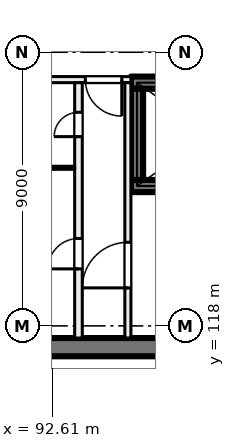
"""IFC4 building model, lengths in metres.
Left out: names, types, materials, properties, quantities, classifications, styles, units other than length and angle.
Written with IfcOpenShell. Run it as: python <this file> out.ifc"""

import sys

from ifc_helpers import new_model, si_unit, direction, frame, frame_2d, origin, place, context, subcontext, project, spatial, rectangle, extrude, element, fill, save


model = new_model("IFC4")
c1 = context("Model", 3, precision=1e-05, world=origin(), true_north=direction((0.0, 1.0)))
c2 = subcontext(c1, "Body", "Model", "MODEL_VIEW")
j1 = project(units=[si_unit("LENGTHUNIT", "METRE"), si_unit("PLANEANGLEUNIT", "RADIAN")], contexts=[c1])
p1 = place(None, origin())
s1 = spatial("IfcSite", under=j1, at=p1, CompositionType="ELEMENT")
p2 = place(p1, origin())
s2 = spatial("IfcBuilding", under=s1, at=p2, CompositionType="ELEMENT")
p3 = place(p2, frame((0.0, 0.0, 17.5)))
s3 = spatial("IfcBuildingStorey", under=s2, at=p3, CompositionType="ELEMENT", Elevation=17.5)
p4 = place(p3, frame((99.6, 117.3, 0.0), z_axis=(0.0, 0.0, 1.0), x_axis=(-1.0, 0.0, 0.0)))
e1 = element("IfcWall", 1, at=p4, inside=s3, PredefinedType="SHEAR", context=c2, shape_type="SweptSolid", body=[
    extrude(rectangle(XDim=8.9, YDim=0.6, at=frame_2d((4.45, 0.0))), origin(), (0.0, 0.0, 1.0), 5.0),
])
p5 = place(p3, frame((107.4, 126.0, 0.0), z_axis=(0.0, 0.0, 1.0), x_axis=(-1.0, 0.0, 0.0)))
e2 = element("IfcWall", 2, at=p5, inside=s3, PredefinedType="SHEAR", context=c2, shape_type="SweptSolid", body=[
    extrude(rectangle(XDim=12.2, YDim=0.4, at=frame_2d((6.1, 0.0))), origin(), (0.0, 0.0, 1.0), 5.0),
])
p6 = place(p5, frame((10.25, 0.0, 0.0)))
e3 = element("IfcOpeningElement", 3, at=p6, cuts=e2, PredefinedType="OPENING", context=c2, shape_type="SweptSolid", body=[
    extrude(rectangle(XDim=1.1, YDim=2.1, at=frame_2d((0.55, 1.05))), frame((0.0, 0.21, 0.0), z_axis=(0.0, -1.0, 0.0), x_axis=(1.0, 0.0, 0.0)), (0.0, 0.0, 1.0), 0.42),
])
p7 = place(p5, frame((0.7, 0.0, 0.0)))
e4 = element("IfcOpeningElement", 4, at=p7, cuts=e2, PredefinedType="OPENING", context=c2, shape_type="SweptSolid", body=[
    extrude(rectangle(XDim=0.8, YDim=2.1, at=frame_2d((0.4, 1.05))), frame((0.0, 0.21, 0.0), z_axis=(0.0, -1.0, 0.0), x_axis=(1.0, 0.0, 0.0)), (0.0, 0.0, 1.0), 0.42),
])
p8 = place(p3, frame((107.4, 122.6, 0.0), z_axis=(0.0, 0.0, 1.0), x_axis=(-1.0, 0.0, 0.0)))
e5 = element("IfcWall", 5, at=p8, inside=s3, PredefinedType="SHEAR", context=c2, shape_type="SweptSolid", body=[
    extrude(rectangle(XDim=12.2, YDim=0.4, at=frame_2d((6.1, 0.0))), origin(), (0.0, 0.0, 1.0), 5.0),
])
p9 = place(p8, frame((7.9, 0.0, 0.0)))
e6 = element("IfcOpeningElement", 6, at=p9, cuts=e5, PredefinedType="OPENING", context=c2, shape_type="SweptSolid", body=[
    extrude(rectangle(XDim=1.1, YDim=2.1, at=frame_2d((0.55, 1.05))), frame((0.0, 0.21, 0.0), z_axis=(0.0, -1.0, 0.0), x_axis=(1.0, 0.0, 0.0)), (0.0, 0.0, 1.0), 0.42),
])
p10 = place(p3, frame((95.4, 125.8, 0.0), z_axis=(0.0, 0.0, 1.0), x_axis=(0.0, -1.0, 0.0)))
e7 = element("IfcWall", 7, at=p10, inside=s3, PredefinedType="SHEAR", context=c2, shape_type="SweptSolid", body=[
    extrude(rectangle(XDim=3.0, YDim=0.4, at=frame_2d((1.5, 0.0))), origin(), (0.0, 0.0, 1.0), 5.0),
])
p11 = place(p3, frame((95.2, 126.1, 0.0), z_axis=(0.0, 0.0, 1.0), x_axis=(-1.0, 0.0, 0.0)))
e8 = element("IfcWall", 8, at=p11, inside=s3, PredefinedType="PARTITIONING", context=c2, shape_type="SweptSolid", body=[
    extrude(rectangle(XDim=3.8, YDim=0.2, at=frame_2d((1.9, 0.0))), origin(), (0.0, 0.0, 1.0), 4.6),
])
p12 = place(p11, frame((0.3, 0.0, 0.0)))
e9 = element("IfcOpeningElement", 9, at=p12, cuts=e8, PredefinedType="OPENING", context=c2, shape_type="SweptSolid", body=[
    extrude(rectangle(XDim=1.2, YDim=2.1, at=frame_2d((0.6, 1.05))), frame((0.0, 0.11, 0.0), z_axis=(0.0, -1.0, 0.0), x_axis=(1.0, 0.0, 0.0)), (0.0, 0.0, 1.0), 0.22),
])
p13 = place(p3, frame((95.1, 117.6, 0.0), z_axis=(0.0, 0.0, 1.0), x_axis=(0.0, 1.0, 0.0)))
e10 = element("IfcWall", 10, at=p13, inside=s3, PredefinedType="PARTITIONING", context=c2, shape_type="SweptSolid", body=[
    extrude(rectangle(XDim=8.4, YDim=0.2, at=frame_2d((4.2, 0.0))), origin(), (0.0, 0.0, 1.0), 4.6),
])
p14 = place(p13, frame((1.65, 0.0, 0.0)))
e11 = element("IfcOpeningElement", 11, at=p14, cuts=e10, PredefinedType="OPENING", context=c2, shape_type="SweptSolid", body=[
    extrude(rectangle(XDim=1.5, YDim=2.1, at=frame_2d((0.75, 1.05))), frame((0.0, 0.11, 0.0), z_axis=(0.0, -1.0, 0.0), x_axis=(1.0, 0.0, 0.0)), (0.0, 0.0, 1.0), 0.22),
])
p15 = place(p3, frame((93.475, 117.6, 0.0), z_axis=(0.0, 0.0, 1.0), x_axis=(0.0, 1.0, 0.0)))
e12 = element("IfcWall", 12, at=p15, inside=s3, PredefinedType="PARTITIONING", context=c2, shape_type="SweptSolid", body=[
    extrude(rectangle(XDim=8.4, YDim=0.25, at=frame_2d((4.2, 0.0))), origin(), (0.0, 0.0, 1.0), 4.6),
])
p16 = place(p15, frame((6.625, 0.0, 0.0)))
e13 = element("IfcOpeningElement", 13, at=p16, cuts=e12, PredefinedType="OPENING", context=c2, shape_type="SweptSolid", body=[
    extrude(rectangle(XDim=0.8, YDim=2.1, at=frame_2d((0.4, 1.05))), frame((0.0, 0.135, 0.0), z_axis=(0.0, -1.0, 0.0), x_axis=(1.0, 0.0, 0.0)), (0.0, 0.0, 1.0), 0.27),
])
p17 = place(p15, frame((2.275, 0.0, 0.0)))
e14 = element("IfcOpeningElement", 14, at=p17, cuts=e12, PredefinedType="OPENING", context=c2, shape_type="SweptSolid", body=[
    extrude(rectangle(XDim=1.0, YDim=2.1, at=frame_2d((0.5, 1.05))), frame((0.0, 0.135, 0.0), z_axis=(0.0, -1.0, 0.0), x_axis=(1.0, 0.0, 0.0)), (0.0, 0.0, 1.0), 0.27),
])
p18 = place(p3, frame((93.35, 123.2, 0.0), z_axis=(0.0, 0.0, 1.0), x_axis=(-1.0, 0.0, 0.0)))
e15 = element("IfcWall", 15, at=p18, inside=s3, PredefinedType="PARTITIONING", context=c2, shape_type="SweptSolid", body=[
    extrude(rectangle(XDim=1.95, YDim=0.1, at=frame_2d((0.975, 0.0))), origin(), (0.0, 0.0, 1.0), 4.6),
])
p19 = place(p12, origin())
e16 = element("IfcDoor", 16, at=p19, inside=s3, OperationType="DOUBLE_DOOR_SINGLE_SWING", PredefinedType="DOOR", context=c2, shape_type="SweptSolid", body=[
    extrude(rectangle(XDim=1.2, YDim=2.1, at=frame_2d((0.6, 1.05))), frame((0.0, 0.025, 0.0), z_axis=(0.0, -1.0, 0.0), x_axis=(1.0, 0.0, 0.0)), (0.0, 0.0, 1.0), 0.05),
])
fill(e9, e16)
p20 = place(p14, origin())
e17 = element("IfcDoor", 17, at=p20, inside=s3, OperationType="DOUBLE_DOOR_SINGLE_SWING", PredefinedType="DOOR", context=c2, shape_type="SweptSolid", body=[
    extrude(rectangle(XDim=1.5, YDim=2.1, at=frame_2d((0.75, 1.05))), frame((0.0, 0.025, 0.0), z_axis=(0.0, -1.0, 0.0), x_axis=(1.0, 0.0, 0.0)), (0.0, 0.0, 1.0), 0.05),
])
fill(e11, e17)
p21 = place(p16, origin())
e18 = element("IfcDoor", 18, at=p21, inside=s3, OperationType="SINGLE_SWING_LEFT", PredefinedType="DOOR", context=c2, shape_type="SweptSolid", body=[
    extrude(rectangle(XDim=0.8, YDim=2.1, at=frame_2d((0.4, 1.05))), frame((0.0, 0.025, 0.0), z_axis=(0.0, -1.0, 0.0), x_axis=(1.0, 0.0, 0.0)), (0.0, 0.0, 1.0), 0.05),
])
fill(e13, e18)
p22 = place(p17, origin())
e19 = element("IfcDoor", 19, at=p22, inside=s3, OperationType="SINGLE_SWING_RIGHT", PredefinedType="DOOR", context=c2, shape_type="SweptSolid", body=[
    extrude(rectangle(XDim=1.0, YDim=2.1, at=frame_2d((0.5, 1.05))), frame((0.0, 0.025, 0.0), z_axis=(0.0, -1.0, 0.0), x_axis=(1.0, 0.0, 0.0)), (0.0, 0.0, 1.0), 0.05),
])
fill(e14, e19)
save(model, sys.argv[1])
